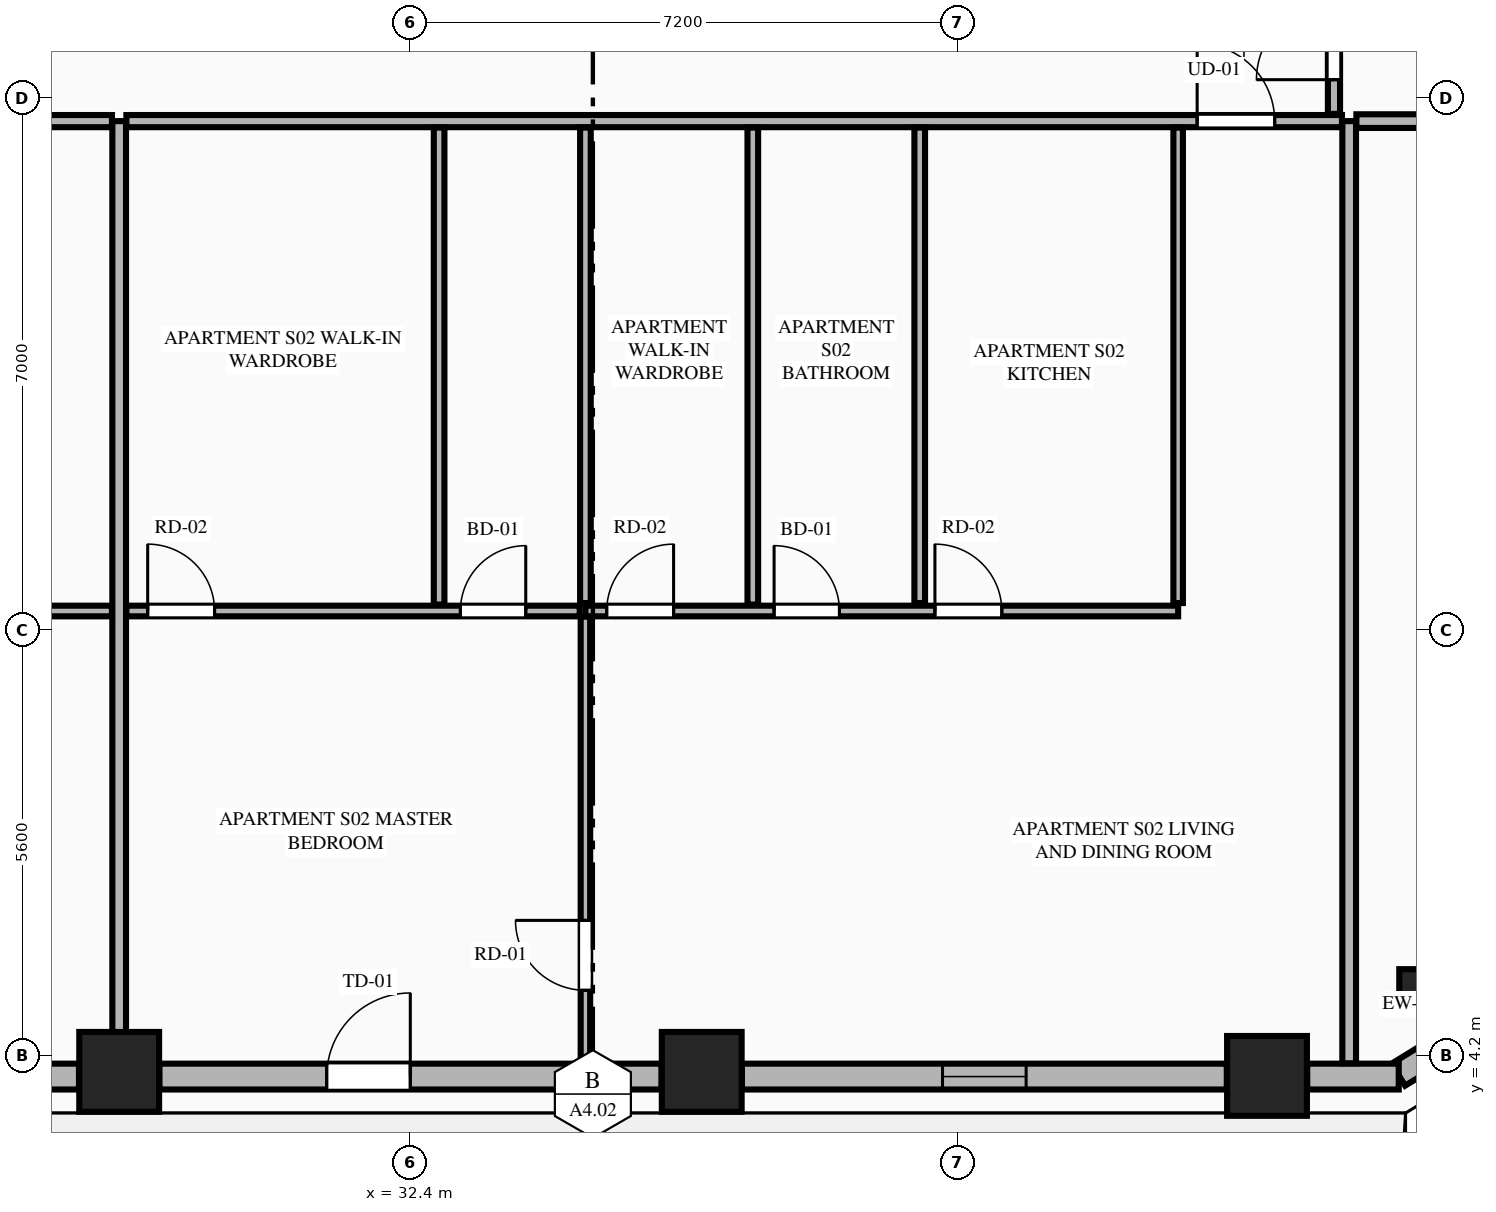
"""IFC4 building model, lengths in metres.
Left out: names, types, materials, properties, quantities, classifications, styles, units other than length and angle.
Written with IfcOpenShell. Run it as: python <this file> out.ifc"""

import sys

from ifc_helpers import new_model, si_unit, direction, frame, frame_2d, origin, origin_2d, place, context, subcontext, project, spatial, rectangle, extrude, element, fill, save


model = new_model("IFC4")
c1 = context("Model", 3, precision=1e-05, world=origin(), true_north=direction((0.0, 1.0)))
c2 = subcontext(c1, "Body", "Model", "MODEL_VIEW")
j1 = project(units=[si_unit("LENGTHUNIT", "METRE"), si_unit("PLANEANGLEUNIT", "RADIAN")], contexts=[c1])
p1 = place(None, origin())
s1 = spatial("IfcSite", under=j1, at=p1, CompositionType="ELEMENT")
p2 = place(p1, origin())
s2 = spatial("IfcBuilding", under=s1, at=p2, CompositionType="ELEMENT")
p3 = place(p2, frame((0.0, 0.0, 130.35)))
s3 = spatial("IfcBuildingStorey", under=s2, at=p3, CompositionType="ELEMENT", Elevation=130.35)
for number, where, z_axis, x_axis in (
    (1, (28.568, 3.992, 0.0), (0.0, 0.0, 1.0), (1.0, 0.0, 0.0)),
    (2, (36.232, 3.992, 0.0), (0.0, 0.0, 1.0), (1.0, 0.0, 0.0)),
    (3, (43.669, 3.939, 0.0), (0.0, 0.0, 1.0), (1.0, 0.0, 0.0)),
):
    element("IfcColumn", number, at=place(p3, frame(where, z_axis=z_axis, x_axis=x_axis)), inside=s3, PredefinedType="COLUMN", context=c2, shape_type="SweptSolid", body=[
        extrude(rectangle(XDim=1.05, YDim=1.05, at=origin_2d()), origin(), (0.0, 0.0, 1.0), 3.55),
    ])
p4 = place(p3, frame((45.659, 5.093, 0.0), z_axis=(0.0, 0.0, 1.0), x_axis=(0.865160173452, 0.501495637342, 0.0)))
e4 = element("IfcColumn", 4, at=p4, inside=s3, PredefinedType="PILASTER", context=c2, shape_type="SweptSolid", body=[
    extrude(rectangle(XDim=0.5, YDim=0.35, at=origin_2d()), origin(), (0.0, 0.0, 1.0), 3.55),
])
p5 = place(p3, frame((45.397, 3.955, 0.0), z_axis=(0.0, 0.0, 1.0), x_axis=(0.851798915137, 0.523868884523, 0.0)))
e5 = element("IfcWall", 5, at=p5, inside=s3, PredefinedType="STANDARD", context=c2, shape_type="SweptSolid", body=[
    extrude(rectangle(XDim=1.848, YDim=0.34, at=frame_2d((0.924, 0.0))), origin(), (0.0, 0.0, 1.0), 3.34),
])
p6 = place(p3, frame((21.66, 3.93, 0.0), z_axis=(0.0, 0.0, 1.0), x_axis=(1.0, 0.0, 0.0)))
e6 = element("IfcWall", 6, at=p6, inside=s3, PredefinedType="STANDARD", context=c2, shape_type="SweptSolid", body=[
    extrude(rectangle(XDim=6.379, YDim=0.34, at=frame_2d((3.189, 0.0))), origin(), (0.0, 0.0, 1.0), 2.797),
])
p7 = place(p6, frame((2.64, 0.0, 0.75)))
e7 = element("IfcOpeningElement", 7, at=p7, cuts=e6, PredefinedType="OPENING", context=c2, shape_type="SweptSolid", body=[
    extrude(rectangle(XDim=1.1, YDim=1.897, at=frame_2d((0.55, 0.948))), frame((0.0, 0.18, 0.0), z_axis=(0.0, -1.0, 0.0), x_axis=(1.0, 0.0, 0.0)), (0.0, 0.0, 1.0), 0.36),
])
p8 = place(p3, frame((29.097, 3.93, 0.0), z_axis=(0.0, 0.0, 1.0), x_axis=(1.0, 0.0, 0.0)))
e8 = element("IfcWall", 8, at=p8, inside=s3, PredefinedType="STANDARD", context=c2, shape_type="SweptSolid", body=[
    extrude(rectangle(XDim=6.606, YDim=0.34, at=frame_2d((3.303, 0.0))), origin(), (0.0, 0.0, 1.0), 2.797),
])
p9 = place(p8, frame((2.201, 0.0, 0.0)))
e9 = element("IfcOpeningElement", 9, at=p9, cuts=e8, PredefinedType="OPENING", context=c2, shape_type="SweptSolid", body=[
    extrude(rectangle(XDim=1.1, YDim=2.25, at=frame_2d((0.55, 1.125))), frame((0.0, 0.18, 0.0), z_axis=(0.0, -1.0, 0.0), x_axis=(1.0, 0.0, 0.0)), (0.0, 0.0, 1.0), 0.36),
])
p10 = place(p3, frame((36.761, 3.93, 0.0), z_axis=(0.0, 0.0, 1.0), x_axis=(1.0, 0.0, 0.0)))
e10 = element("IfcWall", 10, at=p10, inside=s3, PredefinedType="STANDARD", context=c2, shape_type="SweptSolid", body=[
    extrude(rectangle(XDim=6.379, YDim=0.34, at=frame_2d((3.189, 0.0))), origin(), (0.0, 0.0, 1.0), 2.797),
])
p11 = place(p10, frame((2.639, 0.0, 0.75)))
e11 = element("IfcOpeningElement", 11, at=p11, cuts=e10, PredefinedType="OPENING", context=c2, shape_type="SweptSolid", body=[
    extrude(rectangle(XDim=1.1, YDim=1.897, at=frame_2d((0.55, 0.948))), frame((0.0, 0.18, 0.0), z_axis=(0.0, -1.0, 0.0), x_axis=(1.0, 0.0, 0.0)), (0.0, 0.0, 1.0), 0.36),
])
p12 = place(p3, frame((44.198, 3.93, 0.0), z_axis=(0.0, 0.0, 1.0), x_axis=(1.0, 0.0, 0.0)))
e12 = element("IfcWall", 12, at=p12, inside=s3, PredefinedType="STANDARD", context=c2, shape_type="SweptSolid", body=[
    extrude(rectangle(XDim=1.204, YDim=0.34, at=frame_2d((0.602, 0.0))), origin(), (0.0, 0.0, 1.0), 3.34),
])
p13 = place(p3, frame((28.568, 4.105, 0.0), z_axis=(0.0, 0.0, 1.0), x_axis=(0.0, 1.0, 0.0)))
e13 = element("IfcWall", 13, at=p13, inside=s3, PredefinedType="PARTITIONING", context=c2, shape_type="SweptSolid", body=[
    extrude(rectangle(XDim=12.395, YDim=0.18, at=frame_2d((6.198, 0.0))), origin(), (0.0, 0.0, 1.0), 2.722),
])
p14 = place(p3, frame((44.75, 4.105, 0.0), z_axis=(0.0, 0.0, 1.0), x_axis=(0.0, 1.0, 0.0)))
e14 = element("IfcWall", 14, at=p14, inside=s3, PredefinedType="PARTITIONING", context=c2, shape_type="SweptSolid", body=[
    extrude(rectangle(XDim=12.395, YDim=0.18, at=frame_2d((6.198, 0.0))), origin(), (0.0, 0.0, 1.0), 3.34),
])
p15 = place(p3, frame((20.145, 16.5, 0.0), z_axis=(0.0, 0.0, 1.0), x_axis=(1.0, 0.0, 0.0)))
e15 = element("IfcWall", 15, at=p15, inside=s3, PredefinedType="PARTITIONING", context=c2, shape_type="SweptSolid", body=[
    extrude(rectangle(XDim=8.328, YDim=0.16, at=frame_2d((4.164, 0.0))), origin(), (0.0, 0.0, 1.0), 3.34),
])
p16 = place(p15, frame((0.405, 0.0, 0.0)))
e16 = element("IfcOpeningElement", 16, at=p16, cuts=e15, PredefinedType="OPENING", context=c2, shape_type="SweptSolid", body=[
    extrude(rectangle(XDim=1.02, YDim=2.25, at=frame_2d((0.51, 1.125))), frame((0.0, 0.09, 0.0), z_axis=(0.0, -1.0, 0.0), x_axis=(1.0, 0.0, 0.0)), (0.0, 0.0, 1.0), 0.18),
])
p17 = place(p3, frame((22.1, 10.055, 0.0), z_axis=(0.0, 0.0, 1.0), x_axis=(1.0, 0.0, 0.0)))
e17 = element("IfcWall", 17, at=p17, inside=s3, PredefinedType="PLUMBINGWALL", context=c2, shape_type="SweptSolid", body=[
    extrude(rectangle(XDim=6.373, YDim=0.14, at=frame_2d((3.187, 0.0))), origin(), (0.0, 0.0, 1.0), 3.34),
])
p18 = place(p17, frame((4.314, 0.0, 0.0)))
e18 = element("IfcOpeningElement", 18, at=p18, cuts=e17, PredefinedType="OPENING", context=c2, shape_type="SweptSolid", body=[
    extrude(rectangle(XDim=0.86, YDim=2.1, at=frame_2d((0.43, 1.05))), frame((0.0, 0.08, 0.0), z_axis=(0.0, -1.0, 0.0), x_axis=(1.0, 0.0, 0.0)), (0.0, 0.0, 1.0), 0.16),
])
p19 = place(p17, frame((0.22, 0.0, 0.0)))
e19 = element("IfcOpeningElement", 19, at=p19, cuts=e17, PredefinedType="OPENING", context=c2, shape_type="SweptSolid", body=[
    extrude(rectangle(XDim=0.88, YDim=2.15, at=frame_2d((0.44, 1.075))), frame((0.0, 0.08, 0.0), z_axis=(0.0, -1.0, 0.0), x_axis=(1.0, 0.0, 0.0)), (0.0, 0.0, 1.0), 0.16),
])
p20 = place(p3, frame((28.663, 16.5, 0.0), z_axis=(0.0, 0.0, 1.0), x_axis=(1.0, 0.0, 0.0)))
e20 = element("IfcWall", 20, at=p20, inside=s3, PredefinedType="PARTITIONING", context=c2, shape_type="SweptSolid", body=[
    extrude(rectangle(XDim=15.992, YDim=0.16, at=frame_2d((7.996, 0.0))), origin(), (0.0, 0.0, 1.0), 3.34),
])
p21 = place(p20, frame((14.087, 0.0, 0.0)))
e21 = element("IfcOpeningElement", 21, at=p21, cuts=e20, PredefinedType="OPENING", context=c2, shape_type="SweptSolid", body=[
    extrude(rectangle(XDim=1.02, YDim=2.25, at=frame_2d((0.51, 1.125))), frame((0.0, 0.09, 0.0), z_axis=(0.0, -1.0, 0.0), x_axis=(1.0, 0.0, 0.0)), (0.0, 0.0, 1.0), 0.18),
])
p22 = place(p3, frame((42.5, 10.16, 0.0), z_axis=(0.0, 0.0, 1.0), x_axis=(0.0, 1.0, 0.0)))
e22 = element("IfcWall", 22, at=p22, inside=s3, PredefinedType="PARTITIONING", context=c2, shape_type="SweptSolid", body=[
    extrude(rectangle(XDim=6.255, YDim=0.125, at=frame_2d((3.127, 0.0))), origin(), (0.0, 0.0, 1.0), 2.722),
])
p23 = place(p3, frame((34.702, 10.055, 0.0), z_axis=(0.0, 0.0, 1.0), x_axis=(1.0, 0.0, 0.0)))
e23 = element("IfcWall", 23, at=p23, inside=s3, PredefinedType="PLUMBINGWALL", context=c2, shape_type="SweptSolid", body=[
    extrude(rectangle(XDim=7.798, YDim=0.14, at=frame_2d((3.899, 0.0))), origin(), (0.0, 0.0, 1.0), 3.34),
])
p24 = place(p23, frame((0.28, 0.0, 0.0)))
e24 = element("IfcOpeningElement", 24, at=p24, cuts=e23, PredefinedType="OPENING", context=c2, shape_type="SweptSolid", body=[
    extrude(rectangle(XDim=0.88, YDim=2.15, at=frame_2d((0.44, 1.075))), frame((0.0, 0.08, 0.0), z_axis=(0.0, -1.0, 0.0), x_axis=(1.0, 0.0, 0.0)), (0.0, 0.0, 1.0), 0.16),
])
p25 = place(p23, frame((2.482, 0.0, 0.0)))
e25 = element("IfcOpeningElement", 25, at=p25, cuts=e23, PredefinedType="OPENING", context=c2, shape_type="SweptSolid", body=[
    extrude(rectangle(XDim=0.86, YDim=2.1, at=frame_2d((0.43, 1.05))), frame((0.0, 0.08, 0.0), z_axis=(0.0, -1.0, 0.0), x_axis=(1.0, 0.0, 0.0)), (0.0, 0.0, 1.0), 0.16),
])
p26 = place(p23, frame((4.598, 0.0, 0.0)))
e26 = element("IfcOpeningElement", 26, at=p26, cuts=e23, PredefinedType="OPENING", context=c2, shape_type="SweptSolid", body=[
    extrude(rectangle(XDim=0.88, YDim=2.15, at=frame_2d((0.44, 1.075))), frame((0.0, 0.08, 0.0), z_axis=(0.0, -1.0, 0.0), x_axis=(1.0, 0.0, 0.0)), (0.0, 0.0, 1.0), 0.16),
])
p27 = place(p3, frame((28.663, 10.055, 0.0), z_axis=(0.0, 0.0, 1.0), x_axis=(1.0, 0.0, 0.0)))
e27 = element("IfcWall", 27, at=p27, inside=s3, PredefinedType="PLUMBINGWALL", context=c2, shape_type="SweptSolid", body=[
    extrude(rectangle(XDim=5.964, YDim=0.14, at=frame_2d((2.982, 0.0))), origin(), (0.0, 0.0, 1.0), 3.34),
])
p28 = place(p27, frame((0.28, 0.0, 0.0)))
e28 = element("IfcOpeningElement", 28, at=p28, cuts=e27, PredefinedType="OPENING", context=c2, shape_type="SweptSolid", body=[
    extrude(rectangle(XDim=0.88, YDim=2.15, at=frame_2d((0.44, 1.075))), frame((0.0, 0.08, 0.0), z_axis=(0.0, -1.0, 0.0), x_axis=(1.0, 0.0, 0.0)), (0.0, 0.0, 1.0), 0.16),
])
p29 = place(p27, frame((4.394, 0.0, 0.0)))
e29 = element("IfcOpeningElement", 29, at=p29, cuts=e27, PredefinedType="OPENING", context=c2, shape_type="SweptSolid", body=[
    extrude(rectangle(XDim=0.86, YDim=2.1, at=frame_2d((0.43, 1.05))), frame((0.0, 0.08, 0.0), z_axis=(0.0, -1.0, 0.0), x_axis=(1.0, 0.0, 0.0)), (0.0, 0.0, 1.0), 0.16),
])
for number, where, z_axis, x_axis in (
    (30, (39.1, 10.16, 0.0), (0.0, 0.0, 1.0), (0.0, 1.0, 0.0)),
    (31, (34.702, 10.16, 0.0), (0.0, 0.0, 1.0), (0.0, 1.0, 0.0)),
):
    element("IfcWall", number, at=place(p3, frame(where, z_axis=z_axis, x_axis=x_axis)), inside=s3, PredefinedType="PLUMBINGWALL", context=c2, shape_type="SweptSolid", body=[
        extrude(rectangle(XDim=6.255, YDim=0.14, at=frame_2d((3.127, 0.0))), origin(), (0.0, 0.0, 1.0), 3.34),
    ])
p30 = place(p3, frame((34.702, 4.015, 0.0), z_axis=(0.0, 0.0, 1.0), x_axis=(0.0, 1.0, 0.0)))
e32 = element("IfcWall", 32, at=p30, inside=s3, PredefinedType="PARTITIONING", context=c2, shape_type="SweptSolid", body=[
    extrude(rectangle(XDim=5.965, YDim=0.125, at=frame_2d((2.982, 0.0))), origin(), (0.0, 0.0, 1.0), 3.34),
])
p31 = place(p30, frame((1.05, 0.0, 0.0)))
e33 = element("IfcOpeningElement", 33, at=p31, cuts=e32, PredefinedType="OPENING", context=c2, shape_type="SweptSolid", body=[
    extrude(rectangle(XDim=0.92, YDim=2.15, at=frame_2d((0.46, 1.075))), frame((0.0, 0.073, 0.0), z_axis=(0.0, -1.0, 0.0), x_axis=(1.0, 0.0, 0.0)), (0.0, 0.0, 1.0), 0.145),
])
for number, where, z_axis, x_axis in (
    (34, (36.904, 10.14, 0.0), (0.0, 0.0, 1.0), (0.0, 1.0, 0.0)),
    (35, (32.777, 10.14, 0.0), (0.0, 0.0, 1.0), (0.0, 1.0, 0.0)),
):
    element("IfcWall", number, at=place(p3, frame(where, z_axis=z_axis, x_axis=x_axis)), inside=s3, PredefinedType="PLUMBINGWALL", context=c2, shape_type="SweptSolid", body=[
        extrude(rectangle(XDim=6.275, YDim=0.14, at=frame_2d((3.138, 0.0))), origin(), (0.0, 0.0, 1.0), 3.34),
    ])
p32 = place(p3, frame((44.845, 16.5, 0.0), z_axis=(0.0, 0.0, 1.0), x_axis=(1.0, 0.0, 0.0)))
e36 = element("IfcWall", 36, at=p32, inside=s3, PredefinedType="PARTITIONING", context=c2, shape_type="SweptSolid", body=[
    extrude(rectangle(XDim=7.77, YDim=0.18, at=frame_2d((3.885, 0.0))), origin(), (0.0, 0.0, 1.0), 3.34),
])
p33 = place(p3, frame((44.55, 16.595, 0.0), z_axis=(0.0, 0.0, 1.0), x_axis=(0.0, 1.0, 0.0)))
e37 = element("IfcWall", 37, at=p33, inside=s3, PredefinedType="PARTITIONING", context=c2, shape_type="SweptSolid", body=[
    extrude(rectangle(XDim=18.61, YDim=0.16, at=frame_2d((9.305, 0.0))), origin(), (0.0, 0.0, 1.0), 3.34),
])
p34 = place(p33, frame((0.45, 0.0, 0.0)))
e38 = element("IfcOpeningElement", 38, at=p34, cuts=e37, PredefinedType="OPENING", context=c2, shape_type="SweptSolid", body=[
    extrude(rectangle(XDim=1.02, YDim=2.25, at=frame_2d((0.51, 1.125))), frame((0.0, 0.09, 0.0), z_axis=(0.0, -1.0, 0.0), x_axis=(1.0, 0.0, 0.0)), (0.0, 0.0, 1.0), 0.18),
])
p35 = place(p9, origin())
e39 = element("IfcDoor", 39, at=p35, inside=s3, OperationType="SINGLE_SWING_RIGHT", PredefinedType="DOOR", context=c2, shape_type="SweptSolid", body=[
    extrude(rectangle(XDim=1.1, YDim=2.25, at=frame_2d((0.55, 1.125))), frame((0.0, 0.025, 0.0), z_axis=(0.0, -1.0, 0.0), x_axis=(1.0, 0.0, 0.0)), (0.0, 0.0, 1.0), 0.05),
])
fill(e9, e39)
p36 = place(p11, origin())
e40 = element("IfcWindow", 40, at=p36, inside=s3, PartitioningType="SINGLE_PANEL", PredefinedType="WINDOW", context=c2, shape_type="SweptSolid", body=[
    extrude(rectangle(XDim=1.1, YDim=1.897, at=frame_2d((0.55, 0.948))), frame((0.0, 0.03, 0.0), z_axis=(0.0, -1.0, 0.0), x_axis=(1.0, 0.0, 0.0)), (0.0, 0.0, 1.0), 0.06),
])
fill(e11, e40)
p37 = place(p24, origin())
e41 = element("IfcDoor", 41, at=p37, inside=s3, OperationType="SINGLE_SWING_RIGHT", PredefinedType="DOOR", context=c2, shape_type="SweptSolid", body=[
    extrude(rectangle(XDim=0.88, YDim=2.15, at=frame_2d((0.44, 1.075))), frame((0.0, 0.025, 0.0), z_axis=(0.0, -1.0, 0.0), x_axis=(1.0, 0.0, 0.0)), (0.0, 0.0, 1.0), 0.05),
])
fill(e24, e41)
p38 = place(p25, origin())
e42 = element("IfcDoor", 42, at=p38, inside=s3, OperationType="SINGLE_SWING_LEFT", PredefinedType="DOOR", context=c2, shape_type="SweptSolid", body=[
    extrude(rectangle(XDim=0.86, YDim=2.1, at=frame_2d((0.43, 1.05))), frame((0.0, 0.025, 0.0), z_axis=(0.0, -1.0, 0.0), x_axis=(1.0, 0.0, 0.0)), (0.0, 0.0, 1.0), 0.05),
])
fill(e25, e42)
p39 = place(p28, origin())
e43 = element("IfcDoor", 43, at=p39, inside=s3, OperationType="SINGLE_SWING_LEFT", PredefinedType="DOOR", context=c2, shape_type="SweptSolid", body=[
    extrude(rectangle(XDim=0.88, YDim=2.15, at=frame_2d((0.44, 1.075))), frame((0.0, 0.025, 0.0), z_axis=(0.0, -1.0, 0.0), x_axis=(1.0, 0.0, 0.0)), (0.0, 0.0, 1.0), 0.05),
])
fill(e28, e43)
p40 = place(p29, origin())
e44 = element("IfcDoor", 44, at=p40, inside=s3, OperationType="SINGLE_SWING_RIGHT", PredefinedType="DOOR", context=c2, shape_type="SweptSolid", body=[
    extrude(rectangle(XDim=0.86, YDim=2.1, at=frame_2d((0.43, 1.05))), frame((0.0, 0.025, 0.0), z_axis=(0.0, -1.0, 0.0), x_axis=(1.0, 0.0, 0.0)), (0.0, 0.0, 1.0), 0.05),
])
fill(e29, e44)
p41 = place(p21, origin())
e45 = element("IfcDoor", 45, at=p41, inside=s3, OperationType="SINGLE_SWING_LEFT", PredefinedType="DOOR", context=c2, shape_type="SweptSolid", body=[
    extrude(rectangle(XDim=1.02, YDim=2.25, at=frame_2d((0.51, 1.125))), frame((0.0, 0.025, 0.0), z_axis=(0.0, -1.0, 0.0), x_axis=(1.0, 0.0, 0.0)), (0.0, 0.0, 1.0), 0.05),
])
fill(e21, e45)
p42 = place(p26, origin())
e46 = element("IfcDoor", 46, at=p42, inside=s3, OperationType="SINGLE_SWING_LEFT", PredefinedType="DOOR", context=c2, shape_type="SweptSolid", body=[
    extrude(rectangle(XDim=0.88, YDim=2.15, at=frame_2d((0.44, 1.075))), frame((0.0, 0.025, 0.0), z_axis=(0.0, -1.0, 0.0), x_axis=(1.0, 0.0, 0.0)), (0.0, 0.0, 1.0), 0.05),
])
fill(e26, e46)
p43 = place(p31, origin())
e47 = element("IfcDoor", 47, at=p43, inside=s3, OperationType="SINGLE_SWING_RIGHT", PredefinedType="DOOR", context=c2, shape_type="SweptSolid", body=[
    extrude(rectangle(XDim=0.92, YDim=2.15, at=frame_2d((0.46, 1.075))), frame((0.0, 0.025, 0.0), z_axis=(0.0, -1.0, 0.0), x_axis=(1.0, 0.0, 0.0)), (0.0, 0.0, 1.0), 0.05),
])
fill(e33, e47)
p44 = place(p34, origin())
e48 = element("IfcDoor", 48, at=p44, inside=s3, OperationType="SINGLE_SWING_LEFT", PredefinedType="DOOR", context=c2, shape_type="SweptSolid", body=[
    extrude(rectangle(XDim=1.02, YDim=2.25, at=frame_2d((0.51, 1.125))), frame((0.0, 0.025, 0.0), z_axis=(0.0, -1.0, 0.0), x_axis=(1.0, 0.0, 0.0)), (0.0, 0.0, 1.0), 0.05),
])
fill(e38, e48)
save(model, sys.argv[1])
